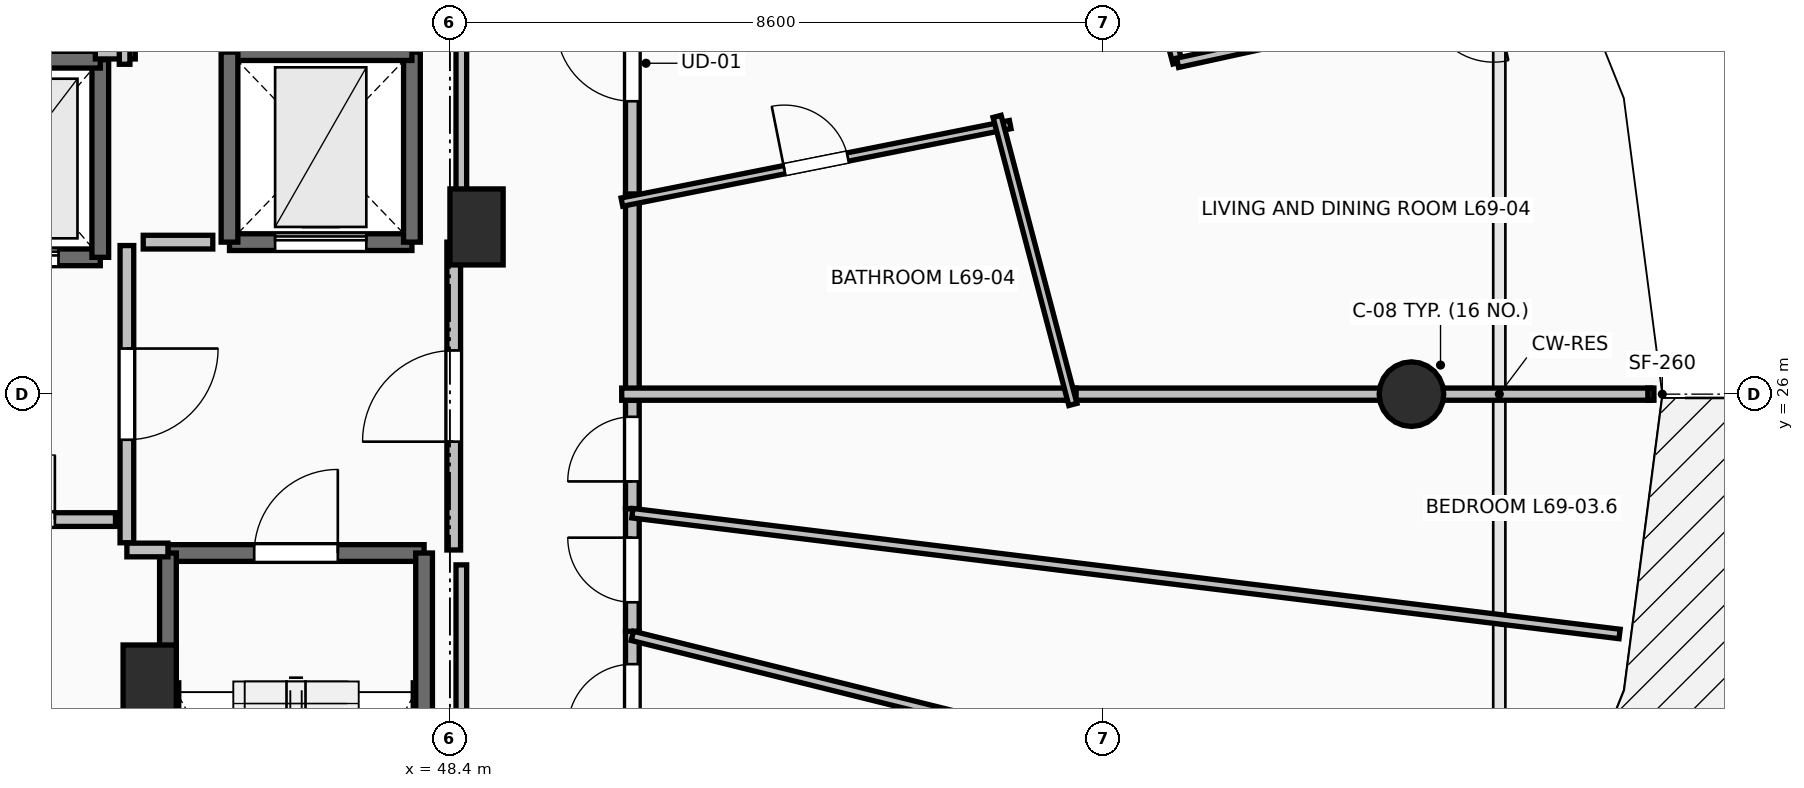
"""IFC4 building model, lengths in metres.
Left out: names, types, materials, properties, quantities, classifications, styles, units other than length and angle.
Written with IfcOpenShell. Run it as: python <this file> out.ifc"""

import sys

from ifc_helpers import new_model, si_unit, direction, frame, frame_2d, origin, origin_2d, place, context, subcontext, project, spatial, rectangle, circle, extrude, element, fill, save


model = new_model("IFC4")
c1 = context("Model", 3, precision=1e-05, world=origin(), true_north=direction((0.0, 1.0)))
c2 = subcontext(c1, "Body", "Model", "MODEL_VIEW")
j1 = project(units=[si_unit("LENGTHUNIT", "METRE"), si_unit("PLANEANGLEUNIT", "RADIAN")], contexts=[c1])
p1 = place(None, origin())
s1 = spatial("IfcSite", under=j1, at=p1, CompositionType="ELEMENT")
p2 = place(p1, origin())
s2 = spatial("IfcBuilding", under=s1, at=p2, CompositionType="ELEMENT")
p3 = place(p2, frame((0.0, 0.0, 255.55)))
s3 = spatial("IfcBuildingStorey", under=s2, at=p3, CompositionType="ELEMENT", Elevation=255.55)
p4 = place(p3, frame((61.05, 26.0, 0.0), z_axis=(0.0, 0.0, 1.0), x_axis=(1.0, 0.0, 0.0)))
e1 = element("IfcColumn", 1, at=p4, inside=s3, PredefinedType="COLUMN", context=c2, shape_type="SweptSolid", body=[
    extrude(circle(Radius=0.425, at=origin_2d()), origin(), (0.0, 0.0, 1.0), 3.55),
])
for number, where, z_axis, x_axis in (
    (2, (48.75, 28.2, 0.0), (0.0, 0.0, 1.0), (1.0, 0.0, 0.0)),
    (3, (44.45, 22.2, 0.0), (0.0, 0.0, 1.0), (1.0, 0.0, 0.0)),
):
    element("IfcColumn", number, at=place(p3, frame(where, z_axis=z_axis, x_axis=x_axis)), inside=s3, PredefinedType="PILASTER", context=c2, shape_type="SweptSolid", body=[
        extrude(rectangle(XDim=0.7, YDim=1.0, at=origin_2d()), origin(), (0.0, 0.0, 1.0), 3.55),
    ])
p5 = place(p3, frame((44.69, 23.91, 0.0), z_axis=(0.0, 0.0, 1.0), x_axis=(1.0, 0.0, 0.0)))
e4 = element("IfcWall", 4, at=p5, inside=s3, PredefinedType="SOLIDWALL", context=c2, shape_type="SweptSolid", body=[
    extrude(rectangle(XDim=3.37, YDim=0.22, at=frame_2d((1.685, 0.0))), origin(), (0.0, 0.0, 1.0), 3.29),
])
p6 = place(p5, frame((1.135, 0.0, 0.0)))
e5 = element("IfcOpeningElement", 5, at=p6, cuts=e4, PredefinedType="OPENING", context=c2, shape_type="SweptSolid", body=[
    extrude(rectangle(XDim=1.1, YDim=2.15, at=frame_2d((0.55, 1.075))), frame((0.0, 0.125, 0.0), z_axis=(0.0, -1.0, 0.0), x_axis=(1.0, 0.0, 0.0)), (0.0, 0.0, 1.0), 0.25),
])
for number, where, z_axis, x_axis in (
    (6, (48.06, 23.91, 0.0), (0.0, 0.0, 1.0), (0.0, -1.0, 0.0)),
    (7, (44.69, 16.49, 0.0), (0.0, 0.0, 1.0), (0.0, 1.0, 0.0)),
):
    element("IfcWall", number, at=place(p3, frame(where, z_axis=z_axis, x_axis=x_axis)), inside=s3, PredefinedType="SOLIDWALL", context=c2, shape_type="SweptSolid", body=[
        extrude(rectangle(XDim=7.42, YDim=0.22, at=frame_2d((3.71, 0.0))), origin(), (0.0, 0.0, 1.0), 3.29),
    ])
p7 = place(p3, frame((41.6, 27.8, 0.0), z_axis=(0.0, 0.0, 1.0), x_axis=(1.0, 0.0, 0.0)))
e8 = element("IfcWall", 8, at=p7, inside=s3, PredefinedType="SOLIDWALL", context=c2, shape_type="SweptSolid", body=[
    extrude(rectangle(XDim=2.2, YDim=0.22, at=frame_2d((1.1, 0.0))), origin(), (0.0, 0.0, 1.0), 3.29),
])
p8 = place(p7, frame((0.55, 0.0, 0.0)))
e9 = element("IfcOpeningElement", 9, at=p8, cuts=e8, PredefinedType="OPENING", context=c2, shape_type="SweptSolid", body=[
    extrude(rectangle(XDim=1.1, YDim=2.2, at=frame_2d((0.55, 1.1))), frame((0.0, 0.125, 0.0), z_axis=(0.0, -1.0, 0.0), x_axis=(1.0, 0.0, 0.0)), (0.0, 0.0, 1.0), 0.25),
])
p9 = place(p3, frame((43.8, 27.8, 0.0), z_axis=(0.0, 0.0, 1.0), x_axis=(0.0, 1.0, 0.0)))
e10 = element("IfcWall", 10, at=p9, inside=s3, PredefinedType="SOLIDWALL", context=c2, shape_type="SweptSolid", body=[
    extrude(rectangle(XDim=2.6, YDim=0.22, at=frame_2d((1.3, 0.0))), origin(), (0.0, 0.0, 1.0), 3.29),
])
p10 = place(p3, frame((43.8, 30.4, 0.0), z_axis=(0.0, 0.0, 1.0), x_axis=(-1.0, 0.0, 0.0)))
e11 = element("IfcWall", 11, at=p10, inside=s3, PredefinedType="SOLIDWALL", context=c2, shape_type="SweptSolid", body=[
    extrude(rectangle(XDim=2.2, YDim=0.22, at=frame_2d((1.1, 0.0))), origin(), (0.0, 0.0, 1.0), 3.29),
])
p11 = place(p3, frame((45.5, 28.0, 0.0), z_axis=(0.0, 0.0, 1.0), x_axis=(1.0, 0.0, 0.0)))
e12 = element("IfcWall", 12, at=p11, inside=s3, PredefinedType="SHEAR", context=c2, shape_type="SweptSolid", body=[
    extrude(rectangle(XDim=2.4, YDim=0.22, at=frame_2d((1.2, 0.0))), origin(), (0.0, 0.0, 1.0), 3.29),
])
p12 = place(p11, frame((0.6, 0.0, 0.0)))
e13 = element("IfcOpeningElement", 13, at=p12, cuts=e12, PredefinedType="OPENING", context=c2, shape_type="SweptSolid", body=[
    extrude(rectangle(XDim=1.2, YDim=2.2, at=frame_2d((0.6, 1.1))), frame((0.0, 0.125, 0.0), z_axis=(0.0, -1.0, 0.0), x_axis=(1.0, 0.0, 0.0)), (0.0, 0.0, 1.0), 0.25),
])
p13 = place(p3, frame((47.9, 28.0, 0.0), z_axis=(0.0, 0.0, 1.0), x_axis=(0.0, 1.0, 0.0)))
e14 = element("IfcWall", 14, at=p13, inside=s3, PredefinedType="SHEAR", context=c2, shape_type="SweptSolid", body=[
    extrude(rectangle(XDim=2.5, YDim=0.22, at=frame_2d((1.25, 0.0))), origin(), (0.0, 0.0, 1.0), 3.29),
])
p14 = place(p3, frame((47.9, 30.5, 0.0), z_axis=(0.0, 0.0, 1.0), x_axis=(-1.0, 0.0, 0.0)))
e15 = element("IfcWall", 15, at=p14, inside=s3, PredefinedType="SHEAR", context=c2, shape_type="SweptSolid", body=[
    extrude(rectangle(XDim=2.4, YDim=0.22, at=frame_2d((1.2, 0.0))), origin(), (0.0, 0.0, 1.0), 3.29),
])
p15 = place(p3, frame((45.5, 30.5, 0.0), z_axis=(0.0, 0.0, 1.0), x_axis=(0.0, -1.0, 0.0)))
e16 = element("IfcWall", 16, at=p15, inside=s3, PredefinedType="SHEAR", context=c2, shape_type="SweptSolid", body=[
    extrude(rectangle(XDim=2.5, YDim=0.22, at=frame_2d((1.25, 0.0))), origin(), (0.0, 0.0, 1.0), 3.29),
])
p16 = place(p3, frame((44.15, 27.955, 0.0), z_axis=(0.0, 0.0, 1.0), x_axis=(0.0, -1.0, 0.0)))
e17 = element("IfcWall", 17, at=p16, inside=s3, PredefinedType="PARTITIONING", context=c2, shape_type="SweptSolid", body=[
    extrude(rectangle(XDim=3.91, YDim=0.18, at=frame_2d((1.955, 0.0))), origin(), (0.0, 0.0, 1.0), 3.29),
])
p17 = place(p16, frame((1.355, 0.0, 0.0)))
e18 = element("IfcOpeningElement", 18, at=p17, cuts=e17, PredefinedType="OPENING", context=c2, shape_type="SweptSolid", body=[
    extrude(rectangle(XDim=1.2, YDim=2.15, at=frame_2d((0.6, 1.075))), frame((0.0, 0.105, 0.0), z_axis=(0.0, -1.0, 0.0), x_axis=(1.0, 0.0, 0.0)), (0.0, 0.0, 1.0), 0.21),
])
p18 = place(p3, frame((44.15, 23.95, 0.0), z_axis=(0.0, 0.0, 1.0), x_axis=(1.0, 0.0, 0.0)))
e19 = element("IfcWall", 19, at=p18, inside=s3, PredefinedType="PARTITIONING", context=c2, shape_type="SweptSolid", body=[
    extrude(rectangle(XDim=0.54, YDim=0.18, at=frame_2d((0.27, 0.0))), origin(), (0.0, 0.0, 1.0), 3.29),
])
p19 = place(p3, frame((48.45, 23.95, 0.0), z_axis=(0.0, 0.0, 1.0), x_axis=(0.0, 1.0, 0.0)))
e20 = element("IfcWall", 20, at=p19, inside=s3, PredefinedType="PARTITIONING", context=c2, shape_type="SweptSolid", body=[
    extrude(rectangle(XDim=4.05, YDim=0.18, at=frame_2d((2.025, 0.0))), origin(), (0.0, 0.0, 1.0), 3.29),
])
p20 = place(p19, frame((1.425, 0.0, 0.0)))
e21 = element("IfcOpeningElement", 21, at=p20, cuts=e20, PredefinedType="OPENING", context=c2, shape_type="SweptSolid", body=[
    extrude(rectangle(XDim=1.2, YDim=2.15, at=frame_2d((0.6, 1.075))), frame((0.0, 0.105, 0.0), z_axis=(0.0, -1.0, 0.0), x_axis=(1.0, 0.0, 0.0)), (0.0, 0.0, 1.0), 0.21),
])
p21 = place(p3, frame((41.555, 24.35, 0.0), z_axis=(0.0, 0.0, 1.0), x_axis=(1.0, 0.0, 0.0)))
e22 = element("IfcWall", 22, at=p21, inside=s3, PredefinedType="PARTITIONING", context=c2, shape_type="SweptSolid", body=[
    extrude(rectangle(XDim=2.445, YDim=0.18, at=frame_2d((1.223, 0.0))), origin(), (0.0, 0.0, 1.0), 3.29),
])
p22 = place(p21, frame((0.798, 0.0, 0.0)))
e23 = element("IfcOpeningElement", 23, at=p22, cuts=e22, PredefinedType="OPENING", context=c2, shape_type="SweptSolid", body=[
    extrude(rectangle(XDim=0.85, YDim=2.1, at=frame_2d((0.425, 1.05))), frame((0.0, 0.105, 0.0), z_axis=(0.0, -1.0, 0.0), x_axis=(1.0, 0.0, 0.0)), (0.0, 0.0, 1.0), 0.21),
])
p23 = place(p3, frame((50.8, 21.166, 0.0), z_axis=(0.0, 0.0, 1.0), x_axis=(0.0, 1.0, 0.0)))
e24 = element("IfcWall", 24, at=p23, inside=s3, PredefinedType="PARTITIONING", context=c2, shape_type="SweptSolid", body=[
    extrude(rectangle(XDim=1.714, YDim=0.18, at=frame_2d((0.857, 0.0))), origin(), (0.0, 0.0, 1.0), 3.29),
])
p24 = place(p23, frame((0.432, 0.0, 0.0)))
e25 = element("IfcOpeningElement", 25, at=p24, cuts=e24, PredefinedType="OPENING", context=c2, shape_type="SweptSolid", body=[
    extrude(rectangle(XDim=0.85, YDim=2.1, at=frame_2d((0.425, 1.05))), frame((0.0, 0.105, 0.0), z_axis=(0.0, -1.0, 0.0), x_axis=(1.0, 0.0, 0.0)), (0.0, 0.0, 1.0), 0.21),
])
p25 = place(p3, frame((50.8, 22.88, 0.0), z_axis=(0.0, 0.0, 1.0), x_axis=(0.0, 1.0, 0.0)))
e26 = element("IfcWall", 26, at=p25, inside=s3, PredefinedType="PARTITIONING", context=c2, shape_type="SweptSolid", body=[
    extrude(rectangle(XDim=1.614, YDim=0.18, at=frame_2d((0.807, 0.0))), origin(), (0.0, 0.0, 1.0), 3.29),
])
p26 = place(p25, frame((0.382, 0.0, 0.0)))
e27 = element("IfcOpeningElement", 27, at=p26, cuts=e26, PredefinedType="OPENING", context=c2, shape_type="SweptSolid", body=[
    extrude(rectangle(XDim=0.85, YDim=2.1, at=frame_2d((0.425, 1.05))), frame((0.0, 0.105, 0.0), z_axis=(0.0, -1.0, 0.0), x_axis=(1.0, 0.0, 0.0)), (0.0, 0.0, 1.0), 0.21),
])
p27 = place(p3, frame((50.8, 24.494, 0.0), z_axis=(0.0, 0.0, 1.0), x_axis=(0.0, 1.0, 0.0)))
e28 = element("IfcWall", 28, at=p27, inside=s3, PredefinedType="PARTITIONING", context=c2, shape_type="SweptSolid", body=[
    extrude(rectangle(XDim=1.566, YDim=0.18, at=frame_2d((0.783, 0.0))), origin(), (0.0, 0.0, 1.0), 3.29),
])
p28 = place(p27, frame((0.358, 0.0, 0.0)))
e29 = element("IfcOpeningElement", 29, at=p28, cuts=e28, PredefinedType="OPENING", context=c2, shape_type="SweptSolid", body=[
    extrude(rectangle(XDim=0.85, YDim=2.1, at=frame_2d((0.425, 1.05))), frame((0.0, 0.105, 0.0), z_axis=(0.0, -1.0, 0.0), x_axis=(1.0, 0.0, 0.0)), (0.0, 0.0, 1.0), 0.21),
])
p29 = place(p3, frame((50.8, 28.494, 0.0), z_axis=(0.0, 0.0, 1.0), x_axis=(0.0, 1.0, 0.0)))
e30 = element("IfcWall", 30, at=p29, inside=s3, PredefinedType="PARTITIONING", context=c2, shape_type="SweptSolid", body=[
    extrude(rectangle(XDim=3.719, YDim=0.18, at=frame_2d((1.859, 0.0))), origin(), (0.0, 0.0, 1.0), 3.29),
])
p30 = place(p29, frame((1.36, 0.0, 0.0)))
e31 = element("IfcOpeningElement", 31, at=p30, cuts=e30, PredefinedType="OPENING", context=c2, shape_type="SweptSolid", body=[
    extrude(rectangle(XDim=1.0, YDim=2.15, at=frame_2d((0.5, 1.075))), frame((0.0, 0.105, 0.0), z_axis=(0.0, -1.0, 0.0), x_axis=(1.0, 0.0, 0.0)), (0.0, 0.0, 1.0), 0.21),
])
p31 = place(p3, frame((50.8, 25.92, 0.0), z_axis=(0.0, 0.0, 1.0), x_axis=(0.0, 1.0, 0.0)))
e32 = element("IfcWall", 32, at=p31, inside=s3, PredefinedType="PARTITIONING", context=c2, shape_type="SweptSolid", body=[
    extrude(rectangle(XDim=2.714, YDim=0.18, at=frame_2d((1.357, 0.0))), origin(), (0.0, 0.0, 1.0), 2.482),
])
p32 = place(p3, frame((62.776, 19.846, 0.0), z_axis=(0.0, 0.0, 1.0), x_axis=(-0.970519565335, 0.241022350211, 0.0)))
e33 = element("IfcWall", 33, at=p32, inside=s3, PredefinedType="PARTITIONING", context=c2, shape_type="SweptSolid", body=[
    extrude(rectangle(XDim=12.34, YDim=0.125, at=frame_2d((6.17, 0.0))), origin(), (0.0, 0.0, 1.0), 2.482),
])
p33 = place(p3, frame((63.788, 22.845, 0.0), z_axis=(0.0, 0.0, 1.0), x_axis=(-0.992598006299, 0.121446275738, 0.0)))
e34 = element("IfcWall", 34, at=p33, inside=s3, PredefinedType="PARTITIONING", context=c2, shape_type="SweptSolid", body=[
    extrude(rectangle(XDim=13.085, YDim=0.125, at=frame_2d((6.542, 0.0))), origin(), (0.0, 0.0, 1.0), 2.482),
])
p34 = place(p3, frame((64.199, 26.0, 0.0), z_axis=(0.0, 0.0, 1.0), x_axis=(-1.0, 0.0, 0.0)))
e35 = element("IfcWall", 35, at=p34, inside=s3, PredefinedType="PARTITIONING", context=c2, shape_type="SweptSolid", body=[
    extrude(rectangle(XDim=7.701, YDim=0.16, at=frame_2d((3.851, 0.0))), origin(), (0.0, 0.0, 1.0), 2.482),
])
p35 = place(p3, frame((56.638, 26.0, 0.0), z_axis=(0.0, 0.0, 1.0), x_axis=(-1.0, 0.0, 0.0)))
e36 = element("IfcWall", 36, at=p35, inside=s3, PredefinedType="PARTITIONING", context=c2, shape_type="SweptSolid", body=[
    extrude(rectangle(XDim=5.978, YDim=0.16, at=frame_2d((2.989, 0.0))), origin(), (0.0, 0.0, 1.0), 2.482),
])
p36 = place(p3, frame((50.663, 28.527, 0.0), z_axis=(0.0, 0.0, 1.0), x_axis=(0.980652709614, 0.195755620935, 0.0)))
e37 = element("IfcWall", 37, at=p36, inside=s3, PredefinedType="PARTITIONING", context=c2, shape_type="SweptSolid", body=[
    extrude(rectangle(XDim=5.209, YDim=0.11, at=frame_2d((2.605, 0.0))), origin(), (0.0, 0.0, 1.0), 2.936),
])
p37 = place(p36, frame((2.18, 0.0, 0.0)))
e38 = element("IfcOpeningElement", 38, at=p37, cuts=e37, PredefinedType="OPENING", context=c2, shape_type="SweptSolid", body=[
    extrude(rectangle(XDim=0.85, YDim=2.1, at=frame_2d((0.425, 1.05))), frame((0.0, 0.07, 0.0), z_axis=(0.0, -1.0, 0.0), x_axis=(1.0, 0.0, 0.0)), (0.0, 0.0, 1.0), 0.14),
])
p38 = place(p3, frame((55.598, 29.654, 0.0), z_axis=(0.0, 0.0, 1.0), x_axis=(0.25449329928, -0.967074537263, 0.0)))
e39 = element("IfcWall", 39, at=p38, inside=s3, PredefinedType="PARTITIONING", context=c2, shape_type="SweptSolid", body=[
    extrude(rectangle(XDim=3.919, YDim=0.11, at=frame_2d((1.959, 0.0))), origin(), (0.0, 0.0, 1.0), 2.482),
])
p39 = place(p3, frame((57.973, 30.359, 0.0), z_axis=(0.0, 0.0, 1.0), x_axis=(-0.254274526126, 0.967132082687, 0.0)))
e40 = element("IfcWall", 40, at=p39, inside=s3, PredefinedType="PARTITIONING", context=c2, shape_type="SweptSolid", body=[
    extrude(rectangle(XDim=1.813, YDim=0.125, at=frame_2d((0.906, 0.0))), origin(), (0.0, 0.0, 1.0), 3.29),
])
p40 = place(p3, frame((60.198, 30.845, 0.0), z_axis=(0.0, 0.0, 1.0), x_axis=(-0.976965000645, -0.213399595862, 0.0)))
e41 = element("IfcWall", 41, at=p40, inside=s3, PredefinedType="PARTITIONING", context=c2, shape_type="SweptSolid", body=[
    extrude(rectangle(XDim=2.278, YDim=0.125, at=frame_2d((1.139, 0.0))), origin(), (0.0, 0.0, 1.0), 2.874),
])
p41 = place(p3, frame((45.28, 28.0, 0.0), z_axis=(0.0, 0.0, 1.0), x_axis=(-1.0, 0.0, 0.0)))
e42 = element("IfcWall", 42, at=p41, inside=s3, PredefinedType="PARTITIONING", context=c2, shape_type="SweptSolid", body=[
    extrude(rectangle(XDim=0.915, YDim=0.18, at=frame_2d((0.458, 0.0))), origin(), (0.0, 0.0, 1.0), 3.29),
])
p42 = place(p3, frame((43.735, 30.48, 0.0), z_axis=(0.0, 0.0, 1.0), x_axis=(1.0, 0.0, 0.0)))
e43 = element("IfcWall", 43, at=p42, inside=s3, PredefinedType="PARTITIONING", context=c2, shape_type="SweptSolid", body=[
    extrude(rectangle(XDim=0.525, YDim=0.14, at=frame_2d((0.262, 0.0))), origin(), (0.0, 0.0, 1.0), 3.29),
])
p43 = place(p3, frame((44.12, 30.34, 0.0), z_axis=(0.0, 0.0, 1.0), x_axis=(0.0, 1.0, 0.0)))
e44 = element("IfcWall", 44, at=p43, inside=s3, PredefinedType="PARTITIONING", context=c2, shape_type="SweptSolid", body=[
    extrude(rectangle(XDim=2.66, YDim=0.14, at=frame_2d((1.33, 0.0))), origin(), (0.0, 0.0, 1.0), 3.29),
])
p44 = place(p3, frame((48.55, 16.24, 0.0), z_axis=(0.0, 0.0, 1.0), x_axis=(0.0, 1.0, 0.0)))
e45 = element("IfcWall", 45, at=p44, inside=s3, PredefinedType="PARTITIONING", context=c2, shape_type="SweptSolid", body=[
    extrude(rectangle(XDim=7.514, YDim=0.14, at=frame_2d((3.757, 0.0))), origin(), (0.0, 0.0, 1.0), 2.482),
])
p45 = place(p3, frame((48.55, 28.196, 0.0), z_axis=(0.0, 0.0, 1.0), x_axis=(0.0, 1.0, 0.0)))
e46 = element("IfcWall", 46, at=p45, inside=s3, PredefinedType="PARTITIONING", context=c2, shape_type="SweptSolid", body=[
    extrude(rectangle(XDim=5.254, YDim=0.14, at=frame_2d((2.627, 0.0))), origin(), (0.0, 0.0, 1.0), 2.482),
])
p46 = place(p6, origin())
e47 = element("IfcDoor", 47, at=p46, inside=s3, OperationType="SINGLE_SWING_RIGHT", PredefinedType="DOOR", context=c2, shape_type="SweptSolid", body=[
    extrude(rectangle(XDim=1.1, YDim=2.15, at=frame_2d((0.55, 1.075))), frame((0.0, 0.025, 0.0), z_axis=(0.0, -1.0, 0.0), x_axis=(1.0, 0.0, 0.0)), (0.0, 0.0, 1.0), 0.05),
])
fill(e5, e47)
p47 = place(p8, origin())
e48 = element("IfcDoor", 48, at=p47, inside=s3, OperationType="SLIDING_TO_LEFT", PredefinedType="DOOR", context=c2, shape_type="SweptSolid", body=[
    extrude(rectangle(XDim=1.1, YDim=2.2, at=frame_2d((0.55, 1.1))), frame((0.0, 0.025, 0.0), z_axis=(0.0, -1.0, 0.0), x_axis=(1.0, 0.0, 0.0)), (0.0, 0.0, 1.0), 0.05),
])
fill(e9, e48)
p48 = place(p12, origin())
e49 = element("IfcDoor", 49, at=p48, inside=s3, OperationType="SLIDING_TO_LEFT", PredefinedType="DOOR", context=c2, shape_type="SweptSolid", body=[
    extrude(rectangle(XDim=1.2, YDim=2.2, at=frame_2d((0.6, 1.1))), frame((0.0, 0.025, 0.0), z_axis=(0.0, -1.0, 0.0), x_axis=(1.0, 0.0, 0.0)), (0.0, 0.0, 1.0), 0.05),
])
fill(e13, e49)
p49 = place(p17, origin())
e50 = element("IfcDoor", 50, at=p49, inside=s3, OperationType="SINGLE_SWING_LEFT", PredefinedType="DOOR", context=c2, shape_type="SweptSolid", body=[
    extrude(rectangle(XDim=1.2, YDim=2.15, at=frame_2d((0.6, 1.075))), frame((0.0, 0.025, 0.0), z_axis=(0.0, -1.0, 0.0), x_axis=(1.0, 0.0, 0.0)), (0.0, 0.0, 1.0), 0.05),
])
fill(e18, e50)
p50 = place(p20, origin())
e51 = element("IfcDoor", 51, at=p50, inside=s3, OperationType="SINGLE_SWING_LEFT", PredefinedType="DOOR", context=c2, shape_type="SweptSolid", body=[
    extrude(rectangle(XDim=1.2, YDim=2.15, at=frame_2d((0.6, 1.075))), frame((0.0, 0.025, 0.0), z_axis=(0.0, -1.0, 0.0), x_axis=(1.0, 0.0, 0.0)), (0.0, 0.0, 1.0), 0.05),
])
fill(e21, e51)
p51 = place(p22, origin())
e52 = element("IfcDoor", 52, at=p51, inside=s3, OperationType="SINGLE_SWING_RIGHT", PredefinedType="DOOR", context=c2, shape_type="SweptSolid", body=[
    extrude(rectangle(XDim=0.85, YDim=2.1, at=frame_2d((0.425, 1.05))), frame((0.0, 0.025, 0.0), z_axis=(0.0, -1.0, 0.0), x_axis=(1.0, 0.0, 0.0)), (0.0, 0.0, 1.0), 0.05),
])
fill(e23, e52)
p52 = place(p30, origin())
e53 = element("IfcDoor", 53, at=p52, inside=s3, OperationType="SINGLE_SWING_RIGHT", PredefinedType="DOOR", context=c2, shape_type="SweptSolid", body=[
    extrude(rectangle(XDim=1.0, YDim=2.15, at=frame_2d((0.5, 1.075))), frame((0.0, 0.025, 0.0), z_axis=(0.0, -1.0, 0.0), x_axis=(1.0, 0.0, 0.0)), (0.0, 0.0, 1.0), 0.05),
])
fill(e31, e53)
p53 = place(p37, origin())
e54 = element("IfcDoor", 54, at=p53, inside=s3, OperationType="SINGLE_SWING_LEFT", PredefinedType="DOOR", context=c2, shape_type="SweptSolid", body=[
    extrude(rectangle(XDim=0.85, YDim=2.1, at=frame_2d((0.425, 1.05))), frame((0.0, 0.025, 0.0), z_axis=(0.0, -1.0, 0.0), x_axis=(1.0, 0.0, 0.0)), (0.0, 0.0, 1.0), 0.05),
])
fill(e38, e54)
p54 = place(p24, origin())
e55 = element("IfcDoor", 55, at=p54, inside=s3, OperationType="SINGLE_SWING_LEFT", PredefinedType="DOOR", context=c2, shape_type="SweptSolid", body=[
    extrude(rectangle(XDim=0.85, YDim=2.1, at=frame_2d((0.425, 1.05))), frame((0.0, 0.025, 0.0), z_axis=(0.0, -1.0, 0.0), x_axis=(1.0, 0.0, 0.0)), (0.0, 0.0, 1.0), 0.05),
])
fill(e25, e55)
p55 = place(p26, origin())
e56 = element("IfcDoor", 56, at=p55, inside=s3, OperationType="SINGLE_SWING_RIGHT", PredefinedType="DOOR", context=c2, shape_type="SweptSolid", body=[
    extrude(rectangle(XDim=0.85, YDim=2.1, at=frame_2d((0.425, 1.05))), frame((0.0, 0.025, 0.0), z_axis=(0.0, -1.0, 0.0), x_axis=(1.0, 0.0, 0.0)), (0.0, 0.0, 1.0), 0.05),
])
fill(e27, e56)
p56 = place(p28, origin())
e57 = element("IfcDoor", 57, at=p56, inside=s3, OperationType="SINGLE_SWING_LEFT", PredefinedType="DOOR", context=c2, shape_type="SweptSolid", body=[
    extrude(rectangle(XDim=0.85, YDim=2.1, at=frame_2d((0.425, 1.05))), frame((0.0, 0.025, 0.0), z_axis=(0.0, -1.0, 0.0), x_axis=(1.0, 0.0, 0.0)), (0.0, 0.0, 1.0), 0.05),
])
fill(e29, e57)
save(model, sys.argv[1])
